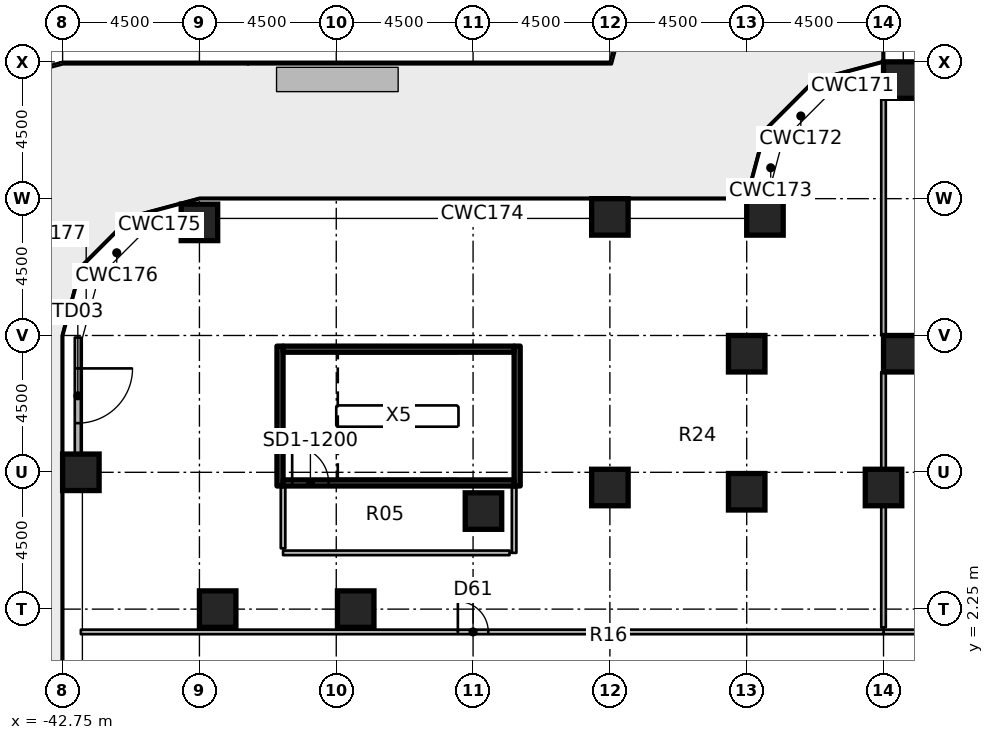
"""IFC4 building model, lengths in metres.
Left out: names, types, materials, properties, quantities, classifications, styles, units other than length and angle.
Written with IfcOpenShell. Run it as: python <this file> out.ifc"""

import sys

from ifc_helpers import new_model, si_unit, direction, frame, frame_2d, origin, origin_2d, place, context, subcontext, project, spatial, rectangle, extrude, element, fill, save


model = new_model("IFC4")
c1 = context("Model", 3, precision=1e-05, world=origin(), true_north=direction((0.0, 1.0)))
c2 = subcontext(c1, "Body", "Model", "MODEL_VIEW")
j1 = project(units=[si_unit("LENGTHUNIT", "METRE"), si_unit("PLANEANGLEUNIT", "RADIAN")], contexts=[c1])
p1 = place(None, origin())
s1 = spatial("IfcSite", under=j1, at=p1, CompositionType="ELEMENT")
p2 = place(p1, origin())
s2 = spatial("IfcBuilding", under=s1, at=p2, CompositionType="ELEMENT")
p3 = place(p2, frame((0.0, 0.0, 17.0)))
s3 = spatial("IfcBuildingStorey", under=s2, at=p3, CompositionType="ELEMENT", Elevation=17.0)
for number, where, z_axis, x_axis in (
    (1, (-42.15, 6.75, 0.0), (0.0, 0.0, 1.0), (1.0, 0.0, 0.0)),
    (2, (-37.65, 2.25, 0.0), (0.0, 0.0, 1.0), (1.0, 0.0, 0.0)),
    (3, (-38.25, 14.97, 0.0), (0.0, 0.0, 1.0), (1.0, 0.0, 0.0)),
    (4, (-33.11, 2.25, 0.0), (0.0, 0.0, 1.0), (1.0, 0.0, 0.0)),
    (5, (-28.908, 5.475, 0.0), (0.0, 0.0, 1.0), (1.0, 0.0, 0.0)),
    (6, (-24.75, 6.25, 0.0), (0.0, 0.0, 1.0), (1.0, 0.0, 0.0)),
    (7, (-24.75, 15.15, 0.0), (0.0, 0.0, 1.0), (1.0, 0.0, 0.0)),
    (8, (-20.25, 6.11, 0.0), (0.0, 0.0, 1.0), (1.0, 0.0, 0.0)),
    (9, (-20.25, 10.65, 0.0), (0.0, 0.0, 1.0), (1.0, 0.0, 0.0)),
    (10, (-19.65, 15.15, 0.0), (0.0, 0.0, 1.0), (1.0, 0.0, 0.0)),
    (11, (-15.75, 6.25, 0.0), (0.0, 0.0, 1.0), (1.0, 0.0, 0.0)),
    (12, (-15.15, 10.65, 0.0), (0.0, 0.0, 1.0), (1.0, 0.0, 0.0)),
    (13, (-15.15, 19.65, 0.0), (0.0, 0.0, 1.0), (1.0, 0.0, 0.0)),
):
    element("IfcColumn", number, at=place(p3, frame(where, z_axis=z_axis, x_axis=x_axis)), inside=s3, PredefinedType="COLUMN", context=c2, shape_type="SweptSolid", body=[
        extrude(rectangle(XDim=1.2, YDim=1.2, at=origin_2d()), origin(), (0.0, 0.0, 1.0), 4.55),
    ])
p4 = place(p3, frame((-42.25, 11.184, 0.0), z_axis=(0.0, 0.0, 1.0), x_axis=(0.0, -1.0, 0.0)))
e14 = element("IfcWall", 14, at=p4, inside=s3, PredefinedType="SOLIDWALL", context=c2, shape_type="SweptSolid", body=[
    extrude(rectangle(XDim=3.834, YDim=0.2, at=frame_2d((1.917, 0.0))), origin(), (0.0, 0.0, 1.0), 4.55),
])
p5 = place(p4, frame((1.017, 0.0, 0.0)))
e15 = element("IfcOpeningElement", 15, at=p5, cuts=e14, PredefinedType="OPENING", context=c2, shape_type="SweptSolid", body=[
    extrude(rectangle(XDim=1.8, YDim=2.4, at=frame_2d((0.9, 1.2))), frame((0.0, 0.11, 0.0), z_axis=(0.0, -1.0, 0.0), x_axis=(1.0, 0.0, 0.0)), (0.0, 0.0, 1.0), 0.22),
])
for number, where, z_axis, x_axis in (
    (16, (-35.6, 6.3, 0.0), (0.0, 0.0, 1.0), (0.0, 1.0, 0.0)),
    (17, (-27.8, 6.3, 0.0), (0.0, 0.0, 1.0), (0.0, 1.0, 0.0)),
):
    element("IfcWall", number, at=place(p3, frame(where, z_axis=z_axis, x_axis=x_axis)), inside=s3, PredefinedType="SHEAR", context=c2, shape_type="SweptSolid", body=[
        extrude(rectangle(XDim=4.6, YDim=0.2, at=frame_2d((2.3, 0.0))), origin(), (0.0, 0.0, 1.0), 4.55),
    ])
p6 = place(p3, frame((-35.5, 6.4, 0.0), z_axis=(0.0, 0.0, 1.0), x_axis=(1.0, 0.0, 0.0)))
e18 = element("IfcWall", 18, at=p6, inside=s3, PredefinedType="SHEAR", context=c2, shape_type="SweptSolid", body=[
    extrude(rectangle(XDim=7.6, YDim=0.2, at=frame_2d((3.8, 0.0))), origin(), (0.0, 0.0, 1.0), 4.55),
])
p7 = place(p6, frame((0.3, 0.0, 0.0)))
e19 = element("IfcOpeningElement", 19, at=p7, cuts=e18, PredefinedType="OPENING", context=c2, shape_type="SweptSolid", body=[
    extrude(rectangle(XDim=1.2, YDim=2.1, at=frame_2d((0.6, 1.05))), frame((0.0, 0.11, 0.0), z_axis=(0.0, -1.0, 0.0), x_axis=(1.0, 0.0, 0.0)), (0.0, 0.0, 1.0), 0.22),
])
p8 = place(p3, frame((-35.5, 10.8, 0.0), z_axis=(0.0, 0.0, 1.0), x_axis=(1.0, 0.0, 0.0)))
e20 = element("IfcWall", 20, at=p8, inside=s3, PredefinedType="SHEAR", context=c2, shape_type="SweptSolid", body=[
    extrude(rectangle(XDim=7.6, YDim=0.2, at=frame_2d((3.8, 0.0))), origin(), (0.0, 0.0, 1.0), 4.55),
])
p9 = place(p3, frame((-27.9, 6.3, 0.0), z_axis=(0.0, 0.0, 1.0), x_axis=(0.0, -1.0, 0.0)))
e21 = element("IfcWall", 21, at=p9, inside=s3, PredefinedType="PARTITIONING", context=c2, shape_type="SweptSolid", body=[
    extrude(rectangle(XDim=2.2, YDim=0.15, at=frame_2d((1.1, 0.0))), origin(), (0.0, 0.0, 1.0), 4.55),
])
p10 = place(p3, frame((-28.05, 4.1, 0.0), z_axis=(0.0, 0.0, 1.0), x_axis=(-1.0, 0.0, 0.0)))
e22 = element("IfcWall", 22, at=p10, inside=s3, PredefinedType="PARTITIONING", context=c2, shape_type="SweptSolid", body=[
    extrude(rectangle(XDim=7.45, YDim=0.15, at=frame_2d((3.725, 0.0))), origin(), (0.0, 0.0, 1.0), 4.55),
])
p11 = place(p3, frame((-35.5, 4.25, 0.0), z_axis=(0.0, 0.0, 1.0), x_axis=(0.0, 1.0, 0.0)))
e23 = element("IfcWall", 23, at=p11, inside=s3, PredefinedType="PARTITIONING", context=c2, shape_type="SweptSolid", body=[
    extrude(rectangle(XDim=2.05, YDim=0.15, at=frame_2d((1.025, 0.0))), origin(), (0.0, 0.0, 1.0), 4.55),
])
p12 = place(p3, frame((-15.75, 1.5, 0.0), z_axis=(0.0, 0.0, 1.0), x_axis=(1.0, 0.0, 0.0)))
e24 = element("IfcWall", 24, at=p12, inside=s3, PredefinedType="PARTITIONING", context=c2, shape_type="SweptSolid", body=[
    extrude(rectangle(XDim=8.25, YDim=0.15, at=frame_2d((4.125, 0.0))), origin(), (0.0, 0.0, 1.0), 4.55),
])
p13 = place(p12, frame((5.0, 0.0, 0.0)))
e25 = element("IfcOpeningElement", 25, at=p13, cuts=e24, PredefinedType="OPENING", context=c2, shape_type="SweptSolid", body=[
    extrude(rectangle(XDim=1.0, YDim=2.1, at=frame_2d((0.5, 1.05))), frame((0.0, 0.085, 0.0), z_axis=(0.0, -1.0, 0.0), x_axis=(1.0, 0.0, 0.0)), (0.0, 0.0, 1.0), 0.17),
])
p14 = place(p3, frame((-42.15, 1.5, 0.0), z_axis=(0.0, 0.0, 1.0), x_axis=(1.0, 0.0, 0.0)))
e26 = element("IfcWall", 26, at=p14, inside=s3, PredefinedType="PARTITIONING", context=c2, shape_type="SweptSolid", body=[
    extrude(rectangle(XDim=26.4, YDim=0.15, at=frame_2d((13.2, 0.0))), origin(), (0.0, 0.0, 1.0), 4.55),
])
p15 = place(p14, frame((12.4, 0.0, 0.0)))
e27 = element("IfcOpeningElement", 27, at=p15, cuts=e26, PredefinedType="OPENING", context=c2, shape_type="SweptSolid", body=[
    extrude(rectangle(XDim=1.0, YDim=2.1, at=frame_2d((0.5, 1.05))), frame((0.0, 0.085, 0.0), z_axis=(0.0, -1.0, 0.0), x_axis=(1.0, 0.0, 0.0)), (0.0, 0.0, 1.0), 0.17),
])
p16 = place(p3, frame((-15.75, 1.65, 0.0), z_axis=(0.0, 0.0, 1.0), x_axis=(0.0, 1.0, 0.0)))
e28 = element("IfcWall", 28, at=p16, inside=s3, PredefinedType="PARTITIONING", context=c2, shape_type="SweptSolid", body=[
    extrude(rectangle(XDim=4.0, YDim=0.15, at=frame_2d((2.0, 0.0))), origin(), (0.0, 0.0, 1.0), 4.55),
])
p17 = place(p3, frame((-15.75, 6.85, 0.0), z_axis=(0.0, 0.0, 1.0), x_axis=(0.0, 1.0, 0.0)))
e29 = element("IfcWall", 29, at=p17, inside=s3, PredefinedType="PARTITIONING", context=c2, shape_type="SweptSolid", body=[
    extrude(rectangle(XDim=3.2, YDim=0.15, at=frame_2d((1.6, 0.0))), origin(), (0.0, 0.0, 1.0), 4.55),
])
p18 = place(p3, frame((-15.75, 11.25, 0.0), z_axis=(0.0, 0.0, 1.0), x_axis=(0.0, 1.0, 0.0)))
e30 = element("IfcWall", 30, at=p18, inside=s3, PredefinedType="PARTITIONING", context=c2, shape_type="SweptSolid", body=[
    extrude(rectangle(XDim=7.8, YDim=0.15, at=frame_2d((3.9, 0.0))), origin(), (0.0, 0.0, 1.0), 4.55),
])
p19 = place(p5, origin())
e31 = element("IfcDoor", 31, at=p19, inside=s3, OperationType="SINGLE_SWING_LEFT", PredefinedType="DOOR", context=c2, shape_type="SweptSolid", body=[
    extrude(rectangle(XDim=1.8, YDim=2.4, at=frame_2d((0.9, 1.2))), frame((0.0, 0.025, 0.0), z_axis=(0.0, -1.0, 0.0), x_axis=(1.0, 0.0, 0.0)), (0.0, 0.0, 1.0), 0.05),
])
fill(e15, e31)
p20 = place(p7, origin())
e32 = element("IfcDoor", 32, at=p20, inside=s3, OperationType="SINGLE_SWING_RIGHT", PredefinedType="DOOR", context=c2, shape_type="SweptSolid", body=[
    extrude(rectangle(XDim=1.2, YDim=2.1, at=frame_2d((0.6, 1.05))), frame((0.0, 0.025, 0.0), z_axis=(0.0, -1.0, 0.0), x_axis=(1.0, 0.0, 0.0)), (0.0, 0.0, 1.0), 0.05),
])
fill(e19, e32)
p21 = place(p15, origin())
e33 = element("IfcDoor", 33, at=p21, inside=s3, OperationType="SINGLE_SWING_LEFT", PredefinedType="DOOR", context=c2, shape_type="SweptSolid", body=[
    extrude(rectangle(XDim=1.0, YDim=2.1, at=frame_2d((0.5, 1.05))), frame((0.0, 0.025, 0.0), z_axis=(0.0, -1.0, 0.0), x_axis=(1.0, 0.0, 0.0)), (0.0, 0.0, 1.0), 0.05),
])
fill(e27, e33)
save(model, sys.argv[1])
